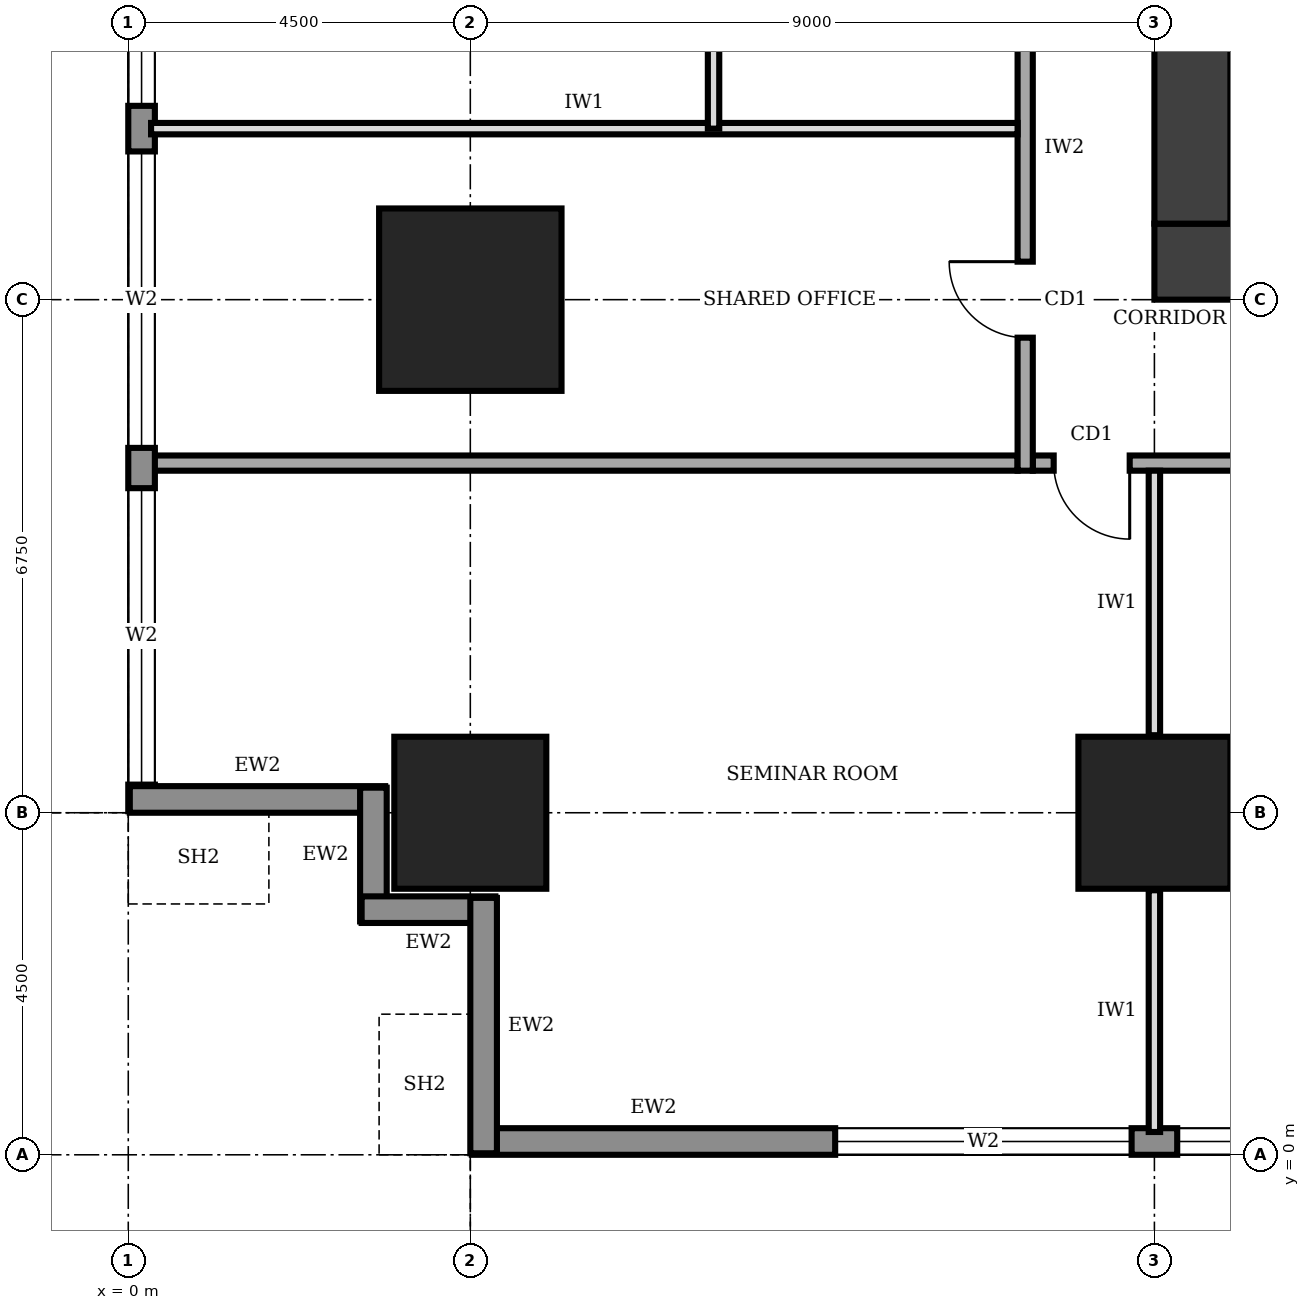
"""IFC4 building model, lengths in metres.
Left out: names, types, materials, properties, quantities, classifications, styles, units other than length and angle.
Written with IfcOpenShell. Run it as: python <this file> out.ifc"""

import sys

from ifc_helpers import new_model, si_unit, direction, frame, frame_2d, origin, origin_2d, place, context, subcontext, project, spatial, rectangle, extrude, element, fill, save


model = new_model("IFC4")
c1 = context("Model", 3, precision=1e-05, world=origin(), true_north=direction((0.0, 1.0)))
c2 = subcontext(c1, "Body", "Model", "MODEL_VIEW")
j1 = project(units=[si_unit("LENGTHUNIT", "METRE"), si_unit("PLANEANGLEUNIT", "RADIAN")], contexts=[c1])
p1 = place(None, origin())
s1 = spatial("IfcSite", under=j1, at=p1, CompositionType="ELEMENT")
p2 = place(p1, origin())
s2 = spatial("IfcBuilding", under=s1, at=p2, CompositionType="ELEMENT")
p3 = place(p2, frame((0.0, 0.0, 53.0)))
s3 = spatial("IfcBuildingStorey", under=s2, at=p3, CompositionType="ELEMENT", Elevation=53.0)
p4 = place(p3, frame((13.5, 11.75, 0.0), z_axis=(0.0, 0.0, 1.0), x_axis=(1.0, 0.0, 0.0)))
e1 = element("IfcWall", 1, at=p4, inside=s3, PredefinedType="SHEAR", context=c2, shape_type="SweptSolid", body=[
    extrude(rectangle(XDim=13.5, YDim=1.0, at=frame_2d((6.75, 0.0))), origin(), (0.0, 0.0, 1.0), 4.0),
])
p5 = place(p4, frame((4.75, 0.0, 0.0)))
e2 = element("IfcOpeningElement", 2, at=p5, cuts=e1, PredefinedType="OPENING", context=c2, shape_type="SweptSolid", body=[
    extrude(rectangle(XDim=1.0, YDim=2.1, at=frame_2d((0.5, 1.05))), frame((0.0, 0.51, 0.0), z_axis=(0.0, -1.0, 0.0), x_axis=(1.0, 0.0, 0.0)), (0.0, 0.0, 1.0), 1.02),
])
p6 = place(p3, frame((14.0, 28.25, 0.0), z_axis=(0.0, 0.0, 1.0), x_axis=(0.0, -1.0, 0.0)))
e3 = element("IfcWall", 3, at=p6, inside=s3, PredefinedType="SHEAR", context=c2, shape_type="SweptSolid", body=[
    extrude(rectangle(XDim=16.0, YDim=1.0, at=frame_2d((8.0, 0.0))), origin(), (0.0, 0.0, 1.0), 4.0),
])
for number, where, z_axis, x_axis in (
    (4, (4.5, 4.5, 0.0), (0.0, 0.0, 1.0), (1.0, 0.0, 0.0)),
    (5, (13.5, 4.5, 0.0), (0.0, 0.0, 1.0), (1.0, 0.0, 0.0)),
):
    element("IfcColumn", number, at=place(p3, frame(where, z_axis=z_axis, x_axis=x_axis)), inside=s3, PredefinedType="COLUMN", context=c2, shape_type="SweptSolid", body=[
        extrude(rectangle(XDim=2.0, YDim=2.0, at=origin_2d()), origin(), (0.0, 0.0, 1.0), 4.0),
    ])
p7 = place(p3, frame((4.5, 11.25, 0.0), z_axis=(0.0, 0.0, 1.0), x_axis=(1.0, 0.0, 0.0)))
e6 = element("IfcColumn", 6, at=p7, inside=s3, PredefinedType="COLUMN", context=c2, shape_type="SweptSolid", body=[
    extrude(rectangle(XDim=2.4, YDim=2.4, at=origin_2d()), origin(), (0.0, 0.0, 1.0), 4.0),
])
p8 = place(p3, frame((4.52, 0.175, 0.0), z_axis=(0.0, 0.0, 1.0), x_axis=(1.0, 0.0, 0.0)))
e7 = element("IfcWall", 7, at=p8, inside=s3, PredefinedType="STANDARD", context=c2, shape_type="SweptSolid", body=[
    extrude(rectangle(XDim=31.46, YDim=0.35, at=frame_2d((15.73, 0.0))), origin(), (0.0, 0.0, 1.0), 3.75),
])
p9 = place(p8, frame((4.78, 0.0, 0.6)))
e8 = element("IfcOpeningElement", 8, at=p9, cuts=e7, PredefinedType="OPENING", context=c2, shape_type="SweptSolid", body=[
    extrude(rectangle(XDim=3.9, YDim=2.6, at=frame_2d((1.95, 1.3))), frame((0.0, 0.185, 0.0), z_axis=(0.0, -1.0, 0.0), x_axis=(1.0, 0.0, 0.0)), (0.0, 0.0, 1.0), 0.37),
])
p10 = place(p8, frame((9.28, 0.0, 0.6)))
e9 = element("IfcOpeningElement", 9, at=p10, cuts=e7, PredefinedType="OPENING", context=c2, shape_type="SweptSolid", body=[
    extrude(rectangle(XDim=3.9, YDim=2.6, at=frame_2d((1.95, 1.3))), frame((0.0, 0.185, 0.0), z_axis=(0.0, -1.0, 0.0), x_axis=(1.0, 0.0, 0.0)), (0.0, 0.0, 1.0), 0.37),
])
p11 = place(p8, frame((13.78, 0.0, 0.6)))
e10 = element("IfcOpeningElement", 10, at=p11, cuts=e7, PredefinedType="OPENING", context=c2, shape_type="SweptSolid", body=[
    extrude(rectangle(XDim=3.9, YDim=2.6, at=frame_2d((1.95, 1.3))), frame((0.0, 0.185, 0.0), z_axis=(0.0, -1.0, 0.0), x_axis=(1.0, 0.0, 0.0)), (0.0, 0.0, 1.0), 0.37),
])
p12 = place(p8, frame((18.28, 0.0, 0.6)))
e11 = element("IfcOpeningElement", 11, at=p12, cuts=e7, PredefinedType="OPENING", context=c2, shape_type="SweptSolid", body=[
    extrude(rectangle(XDim=3.9, YDim=2.6, at=frame_2d((1.95, 1.3))), frame((0.0, 0.185, 0.0), z_axis=(0.0, -1.0, 0.0), x_axis=(1.0, 0.0, 0.0)), (0.0, 0.0, 1.0), 0.37),
])
p13 = place(p8, frame((22.78, 0.0, 0.6)))
e12 = element("IfcOpeningElement", 12, at=p13, cuts=e7, PredefinedType="OPENING", context=c2, shape_type="SweptSolid", body=[
    extrude(rectangle(XDim=3.9, YDim=2.6, at=frame_2d((1.95, 1.3))), frame((0.0, 0.185, 0.0), z_axis=(0.0, -1.0, 0.0), x_axis=(1.0, 0.0, 0.0)), (0.0, 0.0, 1.0), 0.37),
])
p14 = place(p8, frame((27.21, 0.0, 0.6)))
e13 = element("IfcOpeningElement", 13, at=p14, cuts=e7, PredefinedType="OPENING", context=c2, shape_type="SweptSolid", body=[
    extrude(rectangle(XDim=3.9, YDim=2.6, at=frame_2d((1.95, 1.3))), frame((0.0, 0.185, 0.0), z_axis=(0.0, -1.0, 0.0), x_axis=(1.0, 0.0, 0.0)), (0.0, 0.0, 1.0), 0.37),
])
p15 = place(p3, frame((0.175, 35.98, 0.0), z_axis=(0.0, 0.0, 1.0), x_axis=(0.0, -1.0, 0.0)))
e14 = element("IfcWall", 14, at=p15, inside=s3, PredefinedType="STANDARD", context=c2, shape_type="SweptSolid", body=[
    extrude(rectangle(XDim=31.46, YDim=0.35, at=frame_2d((15.73, 0.0))), origin(), (0.0, 0.0, 1.0), 3.75),
])
p16 = place(p15, frame((27.21, 0.0, 0.6)))
e15 = element("IfcOpeningElement", 15, at=p16, cuts=e14, PredefinedType="OPENING", context=c2, shape_type="SweptSolid", body=[
    extrude(rectangle(XDim=3.9, YDim=2.6, at=frame_2d((1.95, 1.3))), frame((0.0, 0.185, 0.0), z_axis=(0.0, -1.0, 0.0), x_axis=(1.0, 0.0, 0.0)), (0.0, 0.0, 1.0), 0.37),
])
p17 = place(p15, frame((22.78, 0.0, 0.6)))
e16 = element("IfcOpeningElement", 16, at=p17, cuts=e14, PredefinedType="OPENING", context=c2, shape_type="SweptSolid", body=[
    extrude(rectangle(XDim=3.9, YDim=2.6, at=frame_2d((1.95, 1.3))), frame((0.0, 0.185, 0.0), z_axis=(0.0, -1.0, 0.0), x_axis=(1.0, 0.0, 0.0)), (0.0, 0.0, 1.0), 0.37),
])
p18 = place(p15, frame((18.28, 0.0, 0.6)))
e17 = element("IfcOpeningElement", 17, at=p18, cuts=e14, PredefinedType="OPENING", context=c2, shape_type="SweptSolid", body=[
    extrude(rectangle(XDim=3.9, YDim=2.6, at=frame_2d((1.95, 1.3))), frame((0.0, 0.185, 0.0), z_axis=(0.0, -1.0, 0.0), x_axis=(1.0, 0.0, 0.0)), (0.0, 0.0, 1.0), 0.37),
])
p19 = place(p15, frame((13.78, 0.0, 0.6)))
e18 = element("IfcOpeningElement", 18, at=p19, cuts=e14, PredefinedType="OPENING", context=c2, shape_type="SweptSolid", body=[
    extrude(rectangle(XDim=3.9, YDim=2.6, at=frame_2d((1.95, 1.3))), frame((0.0, 0.185, 0.0), z_axis=(0.0, -1.0, 0.0), x_axis=(1.0, 0.0, 0.0)), (0.0, 0.0, 1.0), 0.37),
])
p20 = place(p15, frame((9.28, 0.0, 0.6)))
e19 = element("IfcOpeningElement", 19, at=p20, cuts=e14, PredefinedType="OPENING", context=c2, shape_type="SweptSolid", body=[
    extrude(rectangle(XDim=3.9, YDim=2.6, at=frame_2d((1.95, 1.3))), frame((0.0, 0.185, 0.0), z_axis=(0.0, -1.0, 0.0), x_axis=(1.0, 0.0, 0.0)), (0.0, 0.0, 1.0), 0.37),
])
p21 = place(p15, frame((4.78, 0.0, 0.6)))
e20 = element("IfcOpeningElement", 20, at=p21, cuts=e14, PredefinedType="OPENING", context=c2, shape_type="SweptSolid", body=[
    extrude(rectangle(XDim=3.9, YDim=2.6, at=frame_2d((1.95, 1.3))), frame((0.0, 0.185, 0.0), z_axis=(0.0, -1.0, 0.0), x_axis=(1.0, 0.0, 0.0)), (0.0, 0.0, 1.0), 0.37),
])
p22 = place(p3, frame((0.02, 4.675, 0.0), z_axis=(0.0, 0.0, 1.0), x_axis=(1.0, 0.0, 0.0)))
e21 = element("IfcWall", 21, at=p22, inside=s3, PredefinedType="STANDARD", context=c2, shape_type="SweptSolid", body=[
    extrude(rectangle(XDim=3.36, YDim=0.35, at=frame_2d((1.68, 0.0))), origin(), (0.0, 0.0, 1.0), 2.85),
])
for number, where, z_axis, x_axis in (
    (22, (3.225, 4.83, 0.0), (0.0, 0.0, 1.0), (0.0, -1.0, 0.0)),
    (23, (3.07, 3.225, 0.0), (0.0, 0.0, 1.0), (1.0, 0.0, 0.0)),
):
    element("IfcWall", number, at=place(p3, frame(where, z_axis=z_axis, x_axis=x_axis)), inside=s3, PredefinedType="STANDARD", context=c2, shape_type="SweptSolid", body=[
        extrude(rectangle(XDim=1.76, YDim=0.35, at=frame_2d((0.88, 0.0))), origin(), (0.0, 0.0, 1.0), 3.75),
    ])
p23 = place(p3, frame((4.675, 3.38, 0.0), z_axis=(0.0, 0.0, 1.0), x_axis=(0.0, -1.0, 0.0)))
e24 = element("IfcWall", 24, at=p23, inside=s3, PredefinedType="STANDARD", context=c2, shape_type="SweptSolid", body=[
    extrude(rectangle(XDim=3.36, YDim=0.35, at=frame_2d((1.68, 0.0))), origin(), (0.0, 0.0, 1.0), 2.85),
])
p24 = place(p3, frame((11.9, 9.1, 0.0), z_axis=(0.0, 0.0, 1.0), x_axis=(1.0, 0.0, 0.0)))
e25 = element("IfcWall", 25, at=p24, inside=s3, PredefinedType="SOLIDWALL", context=c2, shape_type="SweptSolid", body=[
    extrude(rectangle(XDim=16.9, YDim=0.2, at=frame_2d((8.45, 0.0))), origin(), (0.0, 0.0, 1.0), 3.75),
])
p25 = place(p24, frame((0.275, 0.0, 0.0)))
e26 = element("IfcOpeningElement", 26, at=p25, cuts=e25, PredefinedType="OPENING", context=c2, shape_type="SweptSolid", body=[
    extrude(rectangle(XDim=1.0, YDim=2.1, at=frame_2d((0.5, 1.05))), frame((0.0, 0.11, 0.0), z_axis=(0.0, -1.0, 0.0), x_axis=(1.0, 0.0, 0.0)), (0.0, 0.0, 1.0), 0.22),
])
p26 = place(p24, frame((7.45, 0.0, 0.0)))
e27 = element("IfcOpeningElement", 27, at=p26, cuts=e25, PredefinedType="OPENING", context=c2, shape_type="SweptSolid", body=[
    extrude(rectangle(XDim=1.8, YDim=2.1, at=frame_2d((0.9, 1.05))), frame((0.0, 0.11, 0.0), z_axis=(0.0, -1.0, 0.0), x_axis=(1.0, 0.0, 0.0)), (0.0, 0.0, 1.0), 0.22),
])
p27 = place(p24, frame((15.425, 0.0, 0.0)))
e28 = element("IfcOpeningElement", 28, at=p27, cuts=e25, PredefinedType="OPENING", context=c2, shape_type="SweptSolid", body=[
    extrude(rectangle(XDim=1.0, YDim=2.1, at=frame_2d((0.5, 1.05))), frame((0.0, 0.11, 0.0), z_axis=(0.0, -1.0, 0.0), x_axis=(1.0, 0.0, 0.0)), (0.0, 0.0, 1.0), 0.22),
])
p28 = place(p3, frame((11.8, 32.8, 0.0), z_axis=(0.0, 0.0, 1.0), x_axis=(0.0, -1.0, 0.0)))
e29 = element("IfcWall", 29, at=p28, inside=s3, PredefinedType="SOLIDWALL", context=c2, shape_type="SweptSolid", body=[
    extrude(rectangle(XDim=23.8, YDim=0.2, at=frame_2d((11.9, 0.0))), origin(), (0.0, 0.0, 1.0), 3.75),
])
p29 = place(p28, frame((21.05, 0.0, 0.0)))
e30 = element("IfcOpeningElement", 30, at=p29, cuts=e29, PredefinedType="OPENING", context=c2, shape_type="SweptSolid", body=[
    extrude(rectangle(XDim=1.0, YDim=2.1, at=frame_2d((0.5, 1.05))), frame((0.0, 0.11, 0.0), z_axis=(0.0, -1.0, 0.0), x_axis=(1.0, 0.0, 0.0)), (0.0, 0.0, 1.0), 0.22),
])
p30 = place(p28, frame((17.15, 0.0, 0.0)))
e31 = element("IfcOpeningElement", 31, at=p30, cuts=e29, PredefinedType="OPENING", context=c2, shape_type="SweptSolid", body=[
    extrude(rectangle(XDim=0.9, YDim=2.1, at=frame_2d((0.45, 1.05))), frame((0.0, 0.11, 0.0), z_axis=(0.0, -1.0, 0.0), x_axis=(1.0, 0.0, 0.0)), (0.0, 0.0, 1.0), 0.22),
])
p31 = place(p28, frame((12.35, 0.0, 0.0)))
e32 = element("IfcOpeningElement", 32, at=p31, cuts=e29, PredefinedType="OPENING", context=c2, shape_type="SweptSolid", body=[
    extrude(rectangle(XDim=0.9, YDim=2.1, at=frame_2d((0.45, 1.05))), frame((0.0, 0.11, 0.0), z_axis=(0.0, -1.0, 0.0), x_axis=(1.0, 0.0, 0.0)), (0.0, 0.0, 1.0), 0.22),
])
p32 = place(p28, frame((9.3, 0.0, 0.0)))
e33 = element("IfcOpeningElement", 33, at=p32, cuts=e29, PredefinedType="OPENING", context=c2, shape_type="SweptSolid", body=[
    extrude(rectangle(XDim=0.9, YDim=2.1, at=frame_2d((0.45, 1.05))), frame((0.0, 0.11, 0.0), z_axis=(0.0, -1.0, 0.0), x_axis=(1.0, 0.0, 0.0)), (0.0, 0.0, 1.0), 0.22),
])
p33 = place(p28, frame((6.3, 0.0, 0.0)))
e34 = element("IfcOpeningElement", 34, at=p33, cuts=e29, PredefinedType="OPENING", context=c2, shape_type="SweptSolid", body=[
    extrude(rectangle(XDim=1.0, YDim=2.1, at=frame_2d((0.5, 1.05))), frame((0.0, 0.11, 0.0), z_axis=(0.0, -1.0, 0.0), x_axis=(1.0, 0.0, 0.0)), (0.0, 0.0, 1.0), 0.22),
])
p34 = place(p28, frame((14.4, 0.0, 0.0)))
e35 = element("IfcOpeningElement", 35, at=p34, cuts=e29, PredefinedType="OPENING", context=c2, shape_type="SweptSolid", body=[
    extrude(rectangle(XDim=1.0, YDim=2.1, at=frame_2d((0.5, 1.05))), frame((0.0, 0.11, 0.0), z_axis=(0.0, -1.0, 0.0), x_axis=(1.0, 0.0, 0.0)), (0.0, 0.0, 1.0), 0.22),
])
p35 = place(p28, frame((2.3, 0.0, 0.0)))
e36 = element("IfcOpeningElement", 36, at=p35, cuts=e29, PredefinedType="OPENING", context=c2, shape_type="SweptSolid", body=[
    extrude(rectangle(XDim=1.0, YDim=2.1, at=frame_2d((0.5, 1.05))), frame((0.0, 0.11, 0.0), z_axis=(0.0, -1.0, 0.0), x_axis=(1.0, 0.0, 0.0)), (0.0, 0.0, 1.0), 0.22),
])
p36 = place(p3, frame((0.3, 9.1, 0.0), z_axis=(0.0, 0.0, 1.0), x_axis=(1.0, 0.0, 0.0)))
e37 = element("IfcWall", 37, at=p36, inside=s3, PredefinedType="SOLIDWALL", context=c2, shape_type="SweptSolid", body=[
    extrude(rectangle(XDim=11.4, YDim=0.2, at=frame_2d((5.7, 0.0))), origin(), (0.0, 0.0, 1.0), 3.75),
])
p37 = place(p3, frame((13.5, 0.3, 0.0), z_axis=(0.0, 0.0, 1.0), x_axis=(0.0, 1.0, 0.0)))
e38 = element("IfcWall", 38, at=p37, inside=s3, PredefinedType="PARTITIONING", context=c2, shape_type="SweptSolid", body=[
    extrude(rectangle(XDim=3.18, YDim=0.15, at=frame_2d((1.59, 0.0))), origin(), (0.0, 0.0, 1.0), 2.85),
])
p38 = place(p3, frame((13.5, 5.52, 0.0), z_axis=(0.0, 0.0, 1.0), x_axis=(0.0, 1.0, 0.0)))
e39 = element("IfcWall", 39, at=p38, inside=s3, PredefinedType="PARTITIONING", context=c2, shape_type="SweptSolid", body=[
    extrude(rectangle(XDim=3.48, YDim=0.15, at=frame_2d((1.74, 0.0))), origin(), (0.0, 0.0, 1.0), 2.85),
])
p39 = place(p3, frame((0.3, 13.5, 0.0), z_axis=(0.0, 0.0, 1.0), x_axis=(1.0, 0.0, 0.0)))
e40 = element("IfcWall", 40, at=p39, inside=s3, PredefinedType="PARTITIONING", context=c2, shape_type="SweptSolid", body=[
    extrude(rectangle(XDim=11.4, YDim=0.15, at=frame_2d((5.7, 0.0))), origin(), (0.0, 0.0, 1.0), 3.75),
])
p40 = place(p3, frame((7.7, 13.5, 0.0), z_axis=(0.0, 0.0, 1.0), x_axis=(0.0, 1.0, 0.0)))
e41 = element("IfcWall", 41, at=p40, inside=s3, PredefinedType="PARTITIONING", context=c2, shape_type="SweptSolid", body=[
    extrude(rectangle(XDim=3.4, YDim=0.15, at=frame_2d((1.7, 0.0))), origin(), (0.0, 0.0, 1.0), 3.75),
])
p41 = place(p9, origin())
e42 = element("IfcWindow", 42, at=p41, inside=s3, PartitioningType="SINGLE_PANEL", PredefinedType="WINDOW", context=c2, shape_type="SweptSolid", body=[
    extrude(rectangle(XDim=3.9, YDim=2.6, at=frame_2d((1.95, 1.3))), frame((0.0, 0.03, 0.0), z_axis=(0.0, -1.0, 0.0), x_axis=(1.0, 0.0, 0.0)), (0.0, 0.0, 1.0), 0.06),
])
fill(e8, e42)
p42 = place(p10, origin())
e43 = element("IfcWindow", 43, at=p42, inside=s3, PartitioningType="SINGLE_PANEL", PredefinedType="WINDOW", context=c2, shape_type="SweptSolid", body=[
    extrude(rectangle(XDim=3.9, YDim=2.6, at=frame_2d((1.95, 1.3))), frame((0.0, 0.03, 0.0), z_axis=(0.0, -1.0, 0.0), x_axis=(1.0, 0.0, 0.0)), (0.0, 0.0, 1.0), 0.06),
])
fill(e9, e43)
p43 = place(p16, origin())
e44 = element("IfcWindow", 44, at=p43, inside=s3, PartitioningType="SINGLE_PANEL", PredefinedType="WINDOW", context=c2, shape_type="SweptSolid", body=[
    extrude(rectangle(XDim=3.9, YDim=2.6, at=frame_2d((1.95, 1.3))), frame((0.0, 0.03, 0.0), z_axis=(0.0, -1.0, 0.0), x_axis=(1.0, 0.0, 0.0)), (0.0, 0.0, 1.0), 0.06),
])
fill(e15, e44)
p44 = place(p17, origin())
e45 = element("IfcWindow", 45, at=p44, inside=s3, PartitioningType="SINGLE_PANEL", PredefinedType="WINDOW", context=c2, shape_type="SweptSolid", body=[
    extrude(rectangle(XDim=3.9, YDim=2.6, at=frame_2d((1.95, 1.3))), frame((0.0, 0.03, 0.0), z_axis=(0.0, -1.0, 0.0), x_axis=(1.0, 0.0, 0.0)), (0.0, 0.0, 1.0), 0.06),
])
fill(e16, e45)
p45 = place(p18, origin())
e46 = element("IfcWindow", 46, at=p45, inside=s3, PartitioningType="SINGLE_PANEL", PredefinedType="WINDOW", context=c2, shape_type="SweptSolid", body=[
    extrude(rectangle(XDim=3.9, YDim=2.6, at=frame_2d((1.95, 1.3))), frame((0.0, 0.03, 0.0), z_axis=(0.0, -1.0, 0.0), x_axis=(1.0, 0.0, 0.0)), (0.0, 0.0, 1.0), 0.06),
])
fill(e17, e46)
p46 = place(p25, frame((1.0, 0.0, 0.0), z_axis=(0.0, 0.0, 1.0), x_axis=(-1.0, 0.0, 0.0)))
e47 = element("IfcDoor", 47, at=p46, inside=s3, OperationType="SINGLE_SWING_LEFT", PredefinedType="DOOR", context=c2, shape_type="SweptSolid", body=[
    extrude(rectangle(XDim=1.0, YDim=2.1, at=frame_2d((0.5, 1.05))), frame((0.0, 0.025, 0.0), z_axis=(0.0, -1.0, 0.0), x_axis=(1.0, 0.0, 0.0)), (0.0, 0.0, 1.0), 0.05),
])
fill(e26, e47)
p47 = place(p29, frame((1.0, 0.0, 0.0), z_axis=(0.0, 0.0, 1.0), x_axis=(-1.0, 0.0, 0.0)))
e48 = element("IfcDoor", 48, at=p47, inside=s3, OperationType="SINGLE_SWING_RIGHT", PredefinedType="DOOR", context=c2, shape_type="SweptSolid", body=[
    extrude(rectangle(XDim=1.0, YDim=2.1, at=frame_2d((0.5, 1.05))), frame((0.0, 0.025, 0.0), z_axis=(0.0, -1.0, 0.0), x_axis=(1.0, 0.0, 0.0)), (0.0, 0.0, 1.0), 0.05),
])
fill(e30, e48)
save(model, sys.argv[1])
